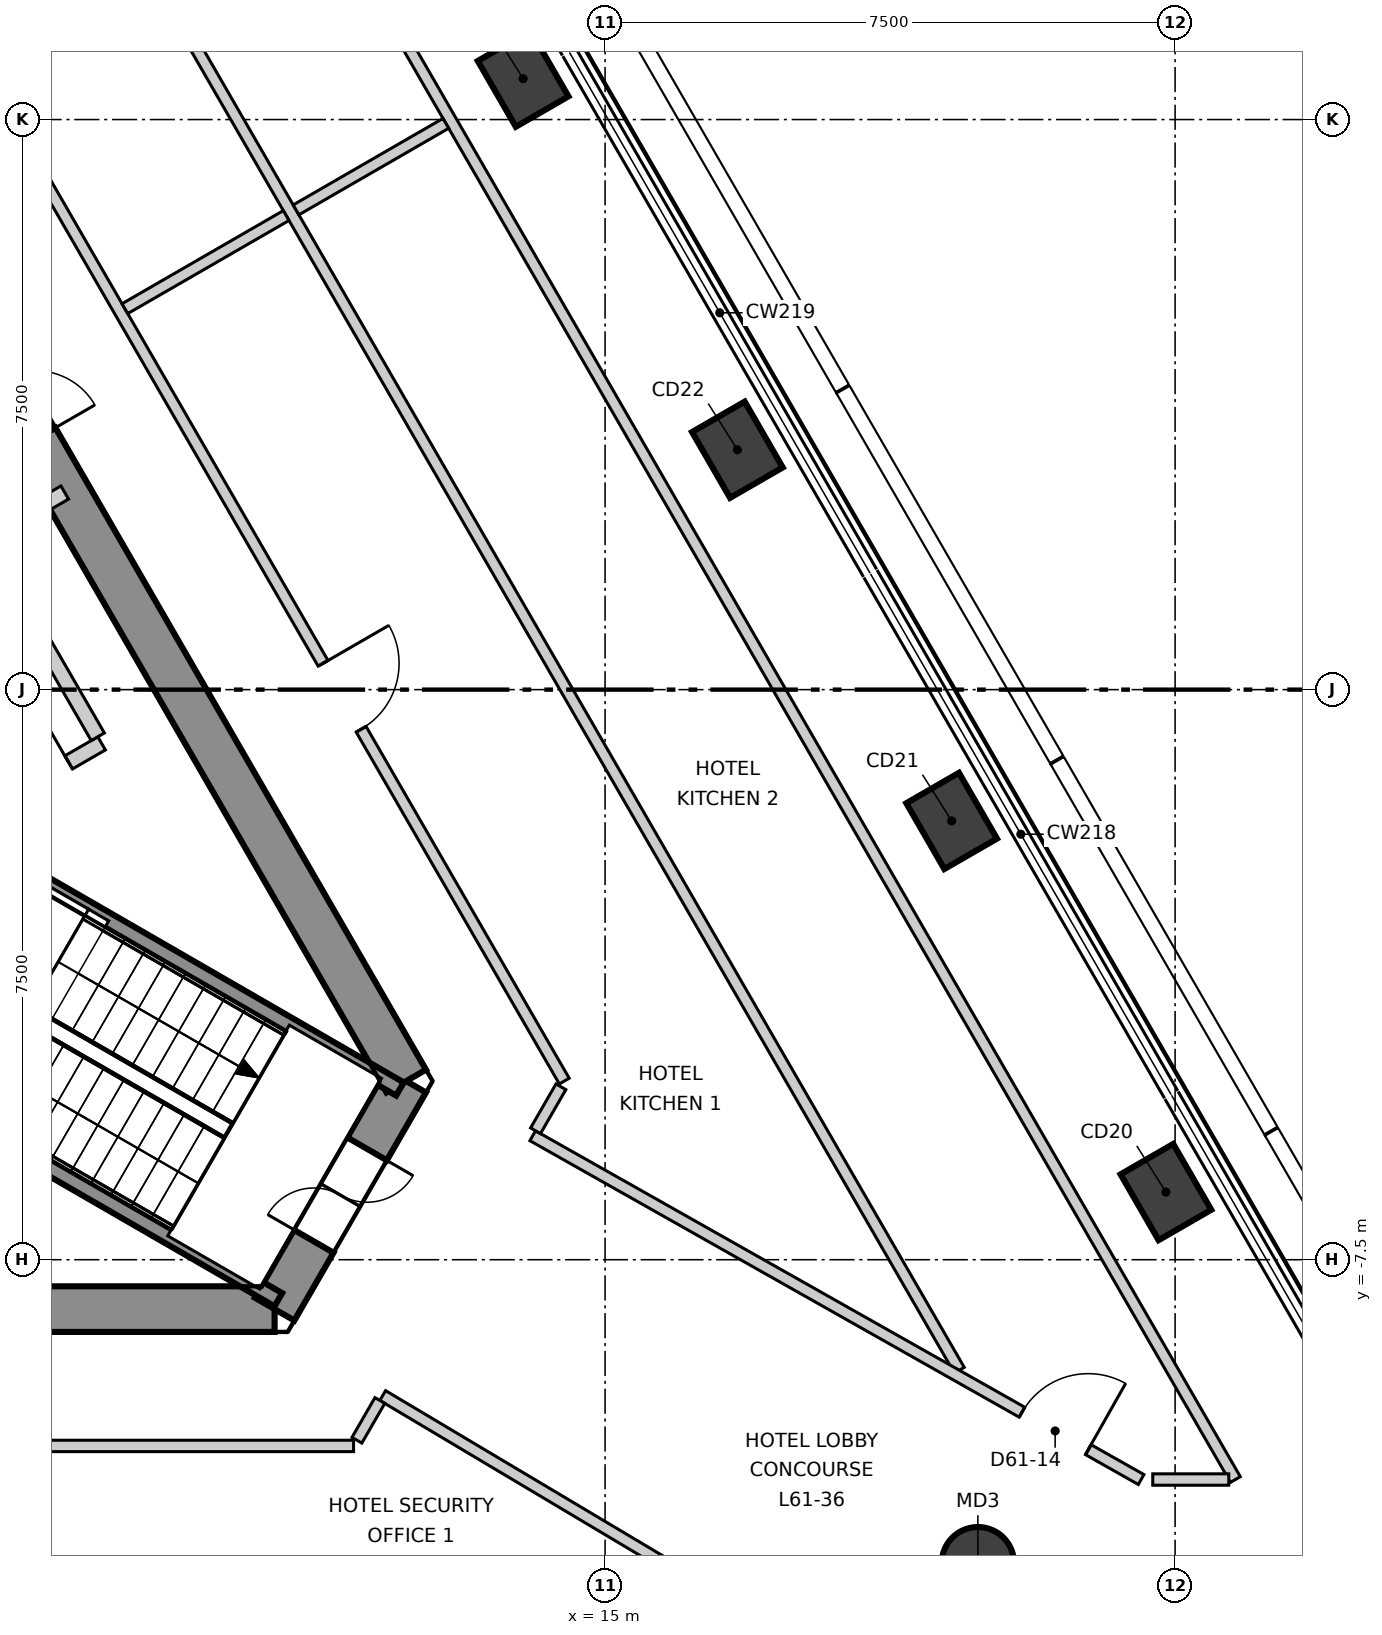
"""IFC4 building model, lengths in metres.
Left out: names, types, materials, properties, quantities, classifications, styles, units other than length and angle.
Written with IfcOpenShell. Run it as: python <this file> out.ifc"""

import sys

from ifc_helpers import new_model, si_unit, direction, frame, frame_2d, origin, origin_2d, place, context, subcontext, project, spatial, polyline, rectangle, circle, outline, extrude, element, fill, save


model = new_model("IFC4")
c1 = context("Model", 3, precision=1e-05, world=origin(), true_north=direction((0.0, 1.0)))
c2 = subcontext(c1, "Body", "Model", "MODEL_VIEW")
j1 = project(units=[si_unit("LENGTHUNIT", "METRE"), si_unit("PLANEANGLEUNIT", "RADIAN")], contexts=[c1])
p1 = place(None, origin())
s1 = spatial("IfcSite", under=j1, at=p1, CompositionType="ELEMENT")
p2 = place(p1, origin())
s2 = spatial("IfcBuilding", under=s1, at=p2, CompositionType="ELEMENT")
p3 = place(p2, frame((0.0, 0.0, 261.8)))
s3 = spatial("IfcBuildingStorey", under=s2, at=p3, CompositionType="ELEMENT", Elevation=261.8)
p4 = place(p3, frame((-10.652, -8.15, -0.3), z_axis=(0.0, 0.0, 1.0), x_axis=(1.0, 0.0, 0.0)))
e1 = element("IfcWall", 1, at=p4, inside=s3, PredefinedType="SHEAR", context=c2, shape_type="SweptSolid", body=[
    extrude(outline(polyline([(-0.173, -0.3), (1.795, -0.3), (3.763, -0.3), (5.731, -0.3), (7.7, -0.3), (9.668, -0.3), (11.636, -0.3), (13.604, -0.3), (15.573, -0.3), (17.541, -0.3), (19.509, -0.3), (21.477, -0.3), (21.131, 0.3), (19.226, 0.3), (17.321, 0.3), (15.415, 0.3), (13.51, 0.3), (11.605, 0.3), (9.699, 0.3), (7.794, 0.3), (5.889, 0.3), (3.984, 0.3), (2.078, 0.3), (0.173, 0.3), (-0.173, -0.3)])), origin(), (0.0, 0.0, 1.0), 6.5),
])
p5 = place(p4, frame((4.026, 0.0, 0.3)))
e2 = element("IfcOpeningElement", 2, at=p5, cuts=e1, PredefinedType="OPENING", context=c2, shape_type="SweptSolid", body=[
    extrude(rectangle(XDim=0.9, YDim=2.1, at=frame_2d((0.45, 1.05))), frame((0.0, 0.31, 0.0), z_axis=(0.0, -1.0, 0.0), x_axis=(1.0, 0.0, 0.0)), (0.0, 0.0, 1.0), 0.62),
])
p6 = place(p4, frame((16.378, 0.0, 0.3)))
e3 = element("IfcOpeningElement", 3, at=p6, cuts=e1, PredefinedType="OPENING", context=c2, shape_type="SweptSolid", body=[
    extrude(rectangle(XDim=0.9, YDim=2.1, at=frame_2d((0.45, 1.05))), frame((0.0, 0.31, 0.0), z_axis=(0.0, -1.0, 0.0), x_axis=(1.0, 0.0, 0.0)), (0.0, 0.0, 1.0), 0.62),
])
p7 = place(p3, frame((10.652, -8.15, -0.3), z_axis=(0.0, 0.0, 1.0), x_axis=(0.49997462182, 0.866040055388, 0.0)))
e4 = element("IfcWall", 4, at=p7, inside=s3, PredefinedType="SHEAR", context=c2, shape_type="SweptSolid", body=[
    extrude(outline(polyline([(-0.173, -0.3), (1.732, -0.301), (3.638, -0.301), (3.291, 0.3), (1.732, 0.3), (0.173, 0.3), (-0.173, -0.3)])), origin(), (0.0, 0.0, 1.0), 6.5),
])
p8 = place(p7, frame((1.032, 0.0, 0.3)))
e5 = element("IfcOpeningElement", 5, at=p8, cuts=e4, PredefinedType="OPENING", context=c2, shape_type="SweptSolid", body=[
    extrude(rectangle(XDim=1.4, YDim=2.1, at=frame_2d((0.7, 1.05))), frame((0.0, 0.31, 0.0), z_axis=(0.0, -1.0, 0.0), x_axis=(1.0, 0.0, 0.0)), (0.0, 0.0, 1.0), 0.621),
])
p9 = place(p3, frame((12.384, -5.15, -0.3), z_axis=(0.0, 0.0, 1.0), x_axis=(-0.500000539815, 0.866025092122, 0.0)))
e6 = element("IfcWall", 6, at=p9, inside=s3, PredefinedType="SHEAR", context=c2, shape_type="SweptSolid", body=[
    extrude(outline(polyline([(-0.173, -0.301), (1.795, -0.301), (3.763, -0.301), (5.731, -0.301), (7.7, -0.301), (9.668, -0.301), (11.636, -0.301), (13.604, -0.3), (15.573, -0.3), (17.541, -0.3), (19.509, -0.3), (21.477, -0.3), (21.131, 0.3), (19.226, 0.3), (17.321, 0.3), (15.415, 0.3), (13.51, 0.3), (11.605, 0.3), (9.699, 0.3), (7.794, 0.3), (5.889, 0.3), (3.984, 0.3), (2.078, 0.3), (0.173, 0.3), (-0.173, -0.301)])), origin(), (0.0, 0.0, 1.0), 6.5),
])
p10 = place(p9, frame((9.752, 0.0, 0.3)))
e7 = element("IfcOpeningElement", 7, at=p10, cuts=e6, PredefinedType="OPENING", context=c2, shape_type="SweptSolid", body=[
    extrude(rectangle(XDim=1.8, YDim=2.1, at=frame_2d((0.9, 1.05))), frame((0.0, 0.31, 0.0), z_axis=(0.0, -1.0, 0.0), x_axis=(1.0, 0.0, 0.0)), (0.0, 0.0, 1.0), 0.621),
])
p11 = place(p9, frame((16.378, 0.0, 0.3)))
e8 = element("IfcOpeningElement", 8, at=p11, cuts=e6, PredefinedType="OPENING", context=c2, shape_type="SweptSolid", body=[
    extrude(rectangle(XDim=0.9, YDim=2.1, at=frame_2d((0.45, 1.05))), frame((0.0, 0.31, 0.0), z_axis=(0.0, -1.0, 0.0), x_axis=(1.0, 0.0, 0.0)), (0.0, 0.0, 1.0), 0.621),
])
for number, where, z_axis, x_axis in (
    (9, (22.379, -6.61, -0.3), (0.0, 0.0, 1.0), (-0.5, 0.866, 0.0)),
    (10, (19.56, -1.727, -0.3), (0.0, 0.0, 1.0), (-0.5, 0.866, 0.0)),
    (11, (16.741, 3.156, -0.3), (0.0, 0.0, 1.0), (-0.5, 0.866, 0.0)),
    (12, (13.922, 8.038, -0.3), (0.0, 0.0, 1.0), (-0.5, 0.866, 0.0)),
):
    element("IfcColumn", number, at=place(p3, frame(where, z_axis=z_axis, x_axis=x_axis)), inside=s3, PredefinedType="COLUMN", context=c2, shape_type="SweptSolid", body=[
        extrude(rectangle(XDim=1.0, YDim=0.8, at=origin_2d()), origin(), (0.0, 0.0, 1.0), 6.5),
    ])
p12 = place(p3, frame((19.905, -11.492, -0.3), z_axis=(0.0, 0.0, 1.0), x_axis=(1.0, 0.0, 0.0)))
e13 = element("IfcColumn", 13, at=p12, inside=s3, PredefinedType="COLUMN", context=c2, shape_type="SweptSolid", body=[
    extrude(circle(Radius=0.475, at=origin_2d()), origin(), (0.0, 0.0, 1.0), 6.5),
])
p13 = place(p3, frame((2.689, 25.293, 0.0), z_axis=(0.0, 0.0, 1.0), x_axis=(0.500022309378, -0.866012523076, 0.0)))
e14 = element("IfcWall", 14, at=p13, inside=s3, PredefinedType="PARTITIONING", context=c2, shape_type="SweptSolid", body=[
    extrude(rectangle(XDim=41.206, YDim=0.15, at=frame_2d((20.603, 0.0))), origin(), (0.0, 0.0, 1.0), 6.2),
])
p14 = place(p3, frame((2.771, 15.1, 0.0), z_axis=(0.0, 0.0, 1.0), x_axis=(0.500017691629, -0.866015189277, 0.0)))
e15 = element("IfcWall", 15, at=p14, inside=s3, PredefinedType="PARTITIONING", context=c2, shape_type="SweptSolid", body=[
    extrude(rectangle(XDim=23.383, YDim=0.15, at=frame_2d((11.691, 0.0))), origin(), (0.0, 0.0, 1.0), 6.2),
])
p15 = place(p14, frame((17.037, 0.0, 0.0)))
e16 = element("IfcOpeningElement", 16, at=p15, cuts=e15, PredefinedType="OPENING", context=c2, shape_type="SweptSolid", body=[
    extrude(rectangle(XDim=1.0, YDim=2.1, at=frame_2d((0.5, 1.05))), frame((0.0, 0.085, 0.0), z_axis=(0.0, -1.0, 0.0), x_axis=(1.0, 0.0, 0.0)), (0.0, 0.0, 1.0), 0.17),
])
p16 = place(p14, frame((5.346, 0.0, 0.0)))
e17 = element("IfcOpeningElement", 17, at=p16, cuts=e15, PredefinedType="OPENING", context=c2, shape_type="SweptSolid", body=[
    extrude(rectangle(XDim=1.0, YDim=2.1, at=frame_2d((0.5, 1.05))), frame((0.0, 0.085, 0.0), z_axis=(0.0, -1.0, 0.0), x_axis=(1.0, 0.0, 0.0)), (0.0, 0.0, 1.0), 0.17),
])
p17 = place(p3, frame((2.166, 21.349, 0.0), z_axis=(0.0, 0.0, 1.0), x_axis=(0.499984980739, -0.866034074985, 0.0)))
e18 = element("IfcWall", 18, at=p17, inside=s3, PredefinedType="PARTITIONING", context=c2, shape_type="SweptSolid", body=[
    extrude(rectangle(XDim=34.991, YDim=0.15, at=frame_2d((17.495, 0.0))), origin(), (0.0, 0.0, 1.0), 6.2),
])
p18 = place(p3, frame((8.682, 5.012, 0.0), z_axis=(0.0, 0.0, 1.0), x_axis=(0.8660395779, 0.499975448907, 0.0)))
e19 = element("IfcWall", 19, at=p18, inside=s3, PredefinedType="PARTITIONING", context=c2, shape_type="SweptSolid", body=[
    extrude(rectangle(XDim=2.45, YDim=0.15, at=frame_2d((1.225, 0.0))), origin(), (0.0, 0.0, 1.0), 5.7),
])
p19 = place(p3, frame((10.934, 6.312, 0.0), z_axis=(0.0, 0.0, 1.0), x_axis=(0.866023021914, 0.500004125498, 0.0)))
e20 = element("IfcWall", 20, at=p19, inside=s3, PredefinedType="PARTITIONING", context=c2, shape_type="SweptSolid", body=[
    extrude(rectangle(XDim=2.276, YDim=0.15, at=frame_2d((1.138, 0.0))), origin(), (0.0, 0.0, 1.0), 5.7),
])
p20 = place(p3, frame((14.048, -5.869, 0.0), z_axis=(0.0, 0.0, 1.0), x_axis=(0.870623660774, -0.491949632889, 0.0)))
e21 = element("IfcWall", 21, at=p20, inside=s3, PredefinedType="PARTITIONING", context=c2, shape_type="SweptSolid", body=[
    extrude(rectangle(XDim=9.194, YDim=0.15, at=frame_2d((4.597, 0.0))), origin(), (0.0, 0.0, 1.0), 5.65),
])
p21 = place(p20, frame((7.395, 0.0, 0.0)))
e22 = element("IfcOpeningElement", 22, at=p21, cuts=e21, PredefinedType="OPENING", context=c2, shape_type="SweptSolid", body=[
    extrude(rectangle(XDim=1.0, YDim=2.1, at=frame_2d((0.5, 1.05))), frame((0.0, 0.085, 0.0), z_axis=(0.0, -1.0, 0.0), x_axis=(1.0, 0.0, 0.0)), (0.0, 0.0, 1.0), 0.17),
])
p22 = place(p3, frame((14.085, -5.804, 0.0), z_axis=(0.0, 0.0, 1.0), x_axis=(0.49975407885, 0.866167339879, 0.0)))
e23 = element("IfcWall", 23, at=p22, inside=s3, PredefinedType="PARTITIONING", context=c2, shape_type="SweptSolid", body=[
    extrude(rectangle(XDim=0.668, YDim=0.15, at=frame_2d((0.334, 0.0))), origin(), (0.0, 0.0, 1.0), 6.2),
])
p23 = place(p3, frame((22.206, -10.392, 0.0), z_axis=(0.0, 0.0, 1.0), x_axis=(1.0, 0.0, 0.0)))
e24 = element("IfcWall", 24, at=p23, inside=s3, PredefinedType="PARTITIONING", context=c2, shape_type="SweptSolid", body=[
    extrude(rectangle(XDim=1.0, YDim=0.15, at=frame_2d((0.5, 0.0))), origin(), (0.0, 0.0, 1.0), 6.2),
])
p24 = place(p3, frame((-11.605, -9.95, 0.0), z_axis=(0.0, 0.0, 1.0), x_axis=(1.0, 0.0, 0.0)))
e25 = element("IfcWall", 25, at=p24, inside=s3, PredefinedType="PARTITIONING", context=c2, shape_type="SweptSolid", body=[
    extrude(rectangle(XDim=23.296, YDim=0.15, at=frame_2d((11.648, 0.0))), origin(), (0.0, 0.0, 1.0), 6.2),
])
p25 = place(p24, frame((11.105, 0.0, 0.0)))
e26 = element("IfcOpeningElement", 26, at=p25, cuts=e25, PredefinedType="OPENING", context=c2, shape_type="SweptSolid", body=[
    extrude(rectangle(XDim=1.0, YDim=2.1, at=frame_2d((0.5, 1.05))), frame((0.0, 0.085, 0.0), z_axis=(0.0, -1.0, 0.0), x_axis=(1.0, 0.0, 0.0)), (0.0, 0.0, 1.0), 0.17),
])
p26 = place(p24, frame((4.034, 0.0, 0.0)))
e27 = element("IfcOpeningElement", 27, at=p26, cuts=e25, PredefinedType="OPENING", context=c2, shape_type="SweptSolid", body=[
    extrude(rectangle(XDim=1.8, YDim=2.1, at=frame_2d((0.9, 1.05))), frame((0.0, 0.085, 0.0), z_axis=(0.0, -1.0, 0.0), x_axis=(1.0, 0.0, 0.0)), (0.0, 0.0, 1.0), 0.17),
])
p27 = place(p24, frame((17.776, 0.0, 0.0)))
e28 = element("IfcOpeningElement", 28, at=p27, cuts=e25, PredefinedType="OPENING", context=c2, shape_type="SweptSolid", body=[
    extrude(rectangle(XDim=1.0, YDim=2.1, at=frame_2d((0.5, 1.05))), frame((0.0, 0.085, 0.0), z_axis=(0.0, -1.0, 0.0), x_axis=(1.0, 0.0, 0.0)), (0.0, 0.0, 1.0), 0.17),
])
p28 = place(p3, frame((12.074, -9.287, 0.0), z_axis=(0.0, 0.0, 1.0), x_axis=(0.859127534181, -0.511761546047, 0.0)))
e29 = element("IfcWall", 29, at=p28, inside=s3, PredefinedType="PARTITIONING", context=c2, shape_type="SweptSolid", body=[
    extrude(rectangle(XDim=9.227, YDim=0.15, at=frame_2d((4.613, 0.0))), origin(), (0.0, 0.0, 1.0), 5.65),
])
p29 = place(p3, frame((11.735, -9.875, 0.0), z_axis=(0.0, 0.0, 1.0), x_axis=(0.500095727698, 0.865970128318, 0.0)))
e30 = element("IfcWall", 30, at=p29, inside=s3, PredefinedType="PARTITIONING", context=c2, shape_type="SweptSolid", body=[
    extrude(rectangle(XDim=0.604, YDim=0.15, at=frame_2d((0.302, 0.0))), origin(), (0.0, 0.0, 1.0), 6.2),
])
p30 = place(p3, frame((7.129, 2.153, 0.0), z_axis=(0.0, 0.0, 1.0), x_axis=(0.866083962871, 0.499898558967, 0.0)))
e31 = element("IfcWall", 31, at=p30, inside=s3, PredefinedType="SOLIDWALL", context=c2, shape_type="SweptSolid", body=[
    extrude(rectangle(XDim=0.88, YDim=0.2, at=frame_2d((0.44, 0.0))), origin(), (0.0, 0.0, 1.0), 6.2),
])
p31 = place(p3, frame((6.642, -1.708, 0.0), z_axis=(0.0, 0.0, 1.0), x_axis=(0.866043441391, 0.499968756647, 0.0)))
e32 = element("IfcWall", 32, at=p31, inside=s3, PredefinedType="SOLIDWALL", context=c2, shape_type="SweptSolid", body=[
    extrude(rectangle(XDim=2.002, YDim=0.2, at=frame_2d((1.001, 0.0))), origin(), (0.0, 0.0, 1.0), 6.2),
])
p32 = place(p31, frame((0.601, 0.0, 0.0)))
e33 = element("IfcOpeningElement", 33, at=p32, cuts=e32, PredefinedType="OPENING", context=c2, shape_type="SweptSolid", body=[
    extrude(rectangle(XDim=0.9, YDim=2.1, at=frame_2d((0.45, 1.05))), frame((0.0, 0.11, 0.0), z_axis=(0.0, -1.0, 0.0), x_axis=(1.0, 0.0, 0.0)), (0.0, 0.0, 1.0), 0.22),
])
p33 = place(p3, frame((6.826, 1.978, 0.0), z_axis=(0.0, 0.0, 1.0), x_axis=(0.499990139034, -0.866031096941, 0.0)))
e34 = element("IfcWall", 34, at=p33, inside=s3, PredefinedType="SOLIDWALL", context=c2, shape_type="SweptSolid", body=[
    extrude(rectangle(XDim=3.0, YDim=0.2, at=frame_2d((1.5, 0.0))), origin(), (0.0, 0.0, 1.0), 6.2),
])
p34 = place(p3, frame((6.529, -1.922, 0.0), z_axis=(0.0, 0.0, 1.0), x_axis=(0.866068467981, -0.499925403204, 0.0)))
e35 = element("IfcWall", 35, at=p34, inside=s3, PredefinedType="SOLIDWALL", context=c2, shape_type="SweptSolid", body=[
    extrude(rectangle(XDim=6.665, YDim=0.2, at=frame_2d((3.332, 0.0))), origin(), (0.0, 0.0, 1.0), 6.2),
])
p35 = place(p3, frame((4.929, -4.693, 0.0), z_axis=(0.0, 0.0, 1.0), x_axis=(0.866005022404, -0.500035299925, 0.0)))
e36 = element("IfcWall", 36, at=p35, inside=s3, PredefinedType="SOLIDWALL", context=c2, shape_type="SweptSolid", body=[
    extrude(rectangle(XDim=6.665, YDim=0.2, at=frame_2d((3.333, 0.0))), origin(), (0.0, 0.0, 1.0), 6.2),
])
p36 = place(p15, origin())
e37 = element("IfcDoor", 37, at=p36, inside=s3, OperationType="SINGLE_SWING_RIGHT", PredefinedType="DOOR", context=c2, shape_type="SweptSolid", body=[
    extrude(rectangle(XDim=1.0, YDim=2.1, at=frame_2d((0.5, 1.05))), frame((0.0, 0.025, 0.0), z_axis=(0.0, -1.0, 0.0), x_axis=(1.0, 0.0, 0.0)), (0.0, 0.0, 1.0), 0.05),
])
fill(e16, e37)
p37 = place(p21, origin())
e38 = element("IfcDoor", 38, at=p37, inside=s3, OperationType="SINGLE_SWING_LEFT", PredefinedType="DOOR", context=c2, shape_type="SweptSolid", body=[
    extrude(rectangle(XDim=1.0, YDim=2.1, at=frame_2d((0.5, 1.05))), frame((0.0, 0.025, 0.0), z_axis=(0.0, -1.0, 0.0), x_axis=(1.0, 0.0, 0.0)), (0.0, 0.0, 1.0), 0.05),
])
fill(e22, e38)
p38 = place(p8, origin())
e39 = element("IfcDoor", 39, at=p38, inside=s3, OperationType="DOUBLE_DOOR_SINGLE_SWING", PredefinedType="DOOR", context=c2, shape_type="SweptSolid", body=[
    extrude(rectangle(XDim=1.4, YDim=2.1, at=frame_2d((0.7, 1.05))), frame((0.0, 0.025, 0.0), z_axis=(0.0, -1.0, 0.0), x_axis=(1.0, 0.0, 0.0)), (0.0, 0.0, 1.0), 0.05),
])
fill(e5, e39)
p39 = place(p32, origin())
e40 = element("IfcDoor", 40, at=p39, inside=s3, OperationType="SINGLE_SWING_LEFT", PredefinedType="DOOR", context=c2, shape_type="SweptSolid", body=[
    extrude(rectangle(XDim=0.9, YDim=2.1, at=frame_2d((0.45, 1.05))), frame((0.0, 0.025, 0.0), z_axis=(0.0, -1.0, 0.0), x_axis=(1.0, 0.0, 0.0)), (0.0, 0.0, 1.0), 0.05),
])
fill(e33, e40)
save(model, sys.argv[1])
